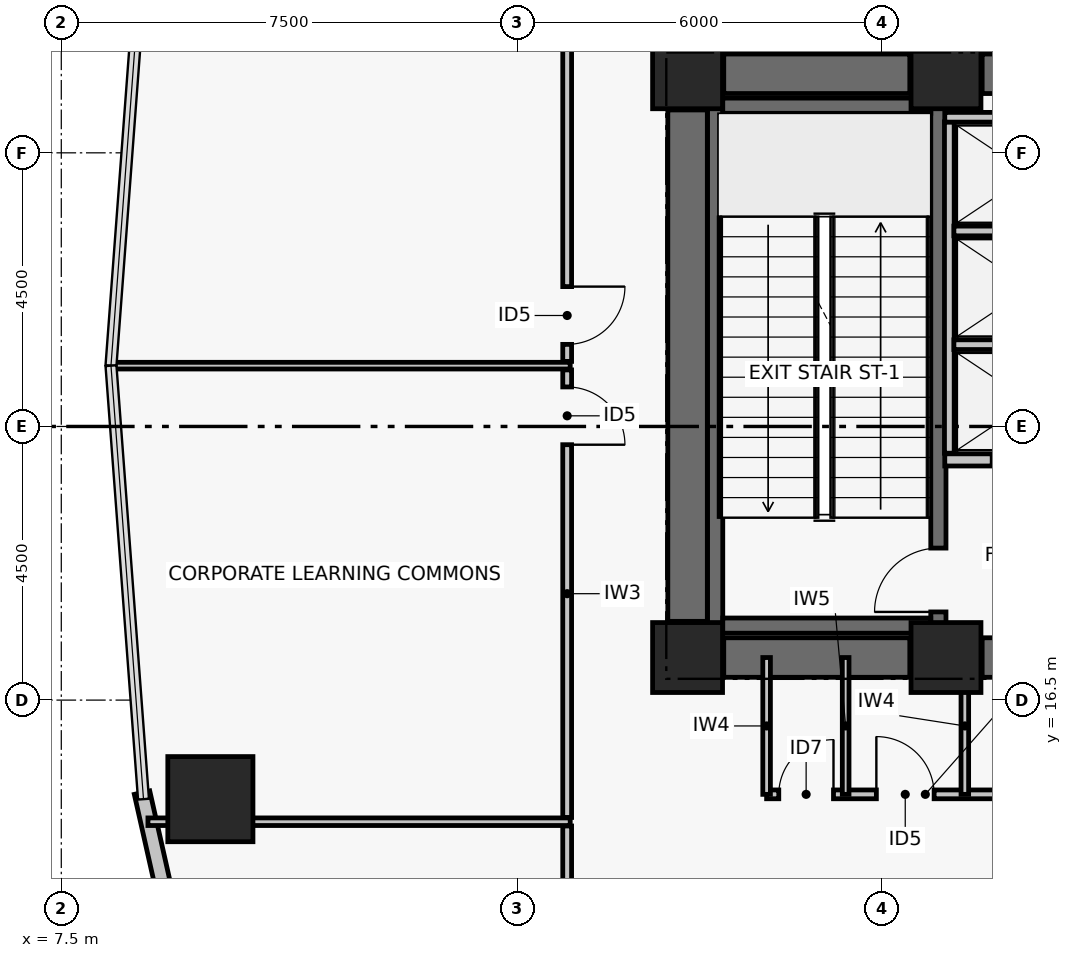
"""IFC4 building model, lengths in metres.
Left out: names, types, materials, properties, quantities, classifications, styles, units other than length and angle.
Written with IfcOpenShell. Run it as: python <this file> out.ifc"""

import sys

from ifc_helpers import new_model, si_unit, direction, frame, frame_2d, origin, origin_2d, place, context, subcontext, project, spatial, rectangle, hollow_rectangle, extrude, element, fill, save


model = new_model("IFC4")
c1 = context("Model", 3, precision=1e-05, world=origin(), true_north=direction((0.0, 1.0)))
c2 = subcontext(c1, "Body", "Model", "MODEL_VIEW")
j1 = project(units=[si_unit("LENGTHUNIT", "METRE"), si_unit("PLANEANGLEUNIT", "RADIAN")], contexts=[c1])
p1 = place(None, origin())
s1 = spatial("IfcSite", under=j1, at=p1, CompositionType="ELEMENT")
p2 = place(p1, origin())
s2 = spatial("IfcBuilding", under=s1, at=p2, CompositionType="ELEMENT")
p3 = place(p2, frame((0.0, 0.0, 22.8)))
s3 = spatial("IfcBuildingStorey", under=s2, at=p3, CompositionType="ELEMENT", Elevation=22.8)
for number, where, z_axis, x_axis in (
    (1, (17.8, 17.2, 0.0), (0.0, 0.0, 1.0), (1.0, 0.0, 0.0)),
    (2, (22.05, 17.2, 0.0), (0.0, 0.0, 1.0), (1.0, 0.0, 0.0)),
    (3, (17.8, 26.8, 0.0), (0.0, 0.0, 1.0), (1.0, 0.0, 0.0)),
    (4, (22.05, 26.8, 0.0), (0.0, 0.0, 1.0), (1.0, 0.0, 0.0)),
):
    element("IfcColumn", number, at=place(p3, frame(where, z_axis=z_axis, x_axis=x_axis)), inside=s3, PredefinedType="COLUMN", context=c2, shape_type="SweptSolid", body=[
        extrude(rectangle(XDim=1.15, YDim=1.15, at=origin_2d()), origin(), (0.0, 0.0, 1.0), 4.8),
    ])
p4 = place(p3, frame((18.395, 17.2, 0.0), z_axis=(0.0, 0.0, 1.0), x_axis=(1.0, 0.0, 0.0)))
e5 = element("IfcWall", 5, at=p4, inside=s3, PredefinedType="SHEAR", context=c2, shape_type="SweptSolid", body=[
    extrude(rectangle(XDim=3.06, YDim=0.65, at=frame_2d((1.53, 0.0))), origin(), (0.0, 0.0, 1.0), 4.55),
])
p5 = place(p3, frame((22.645, 17.2, 0.0), z_axis=(0.0, 0.0, 1.0), x_axis=(1.0, 0.0, 0.0)))
e6 = element("IfcWall", 6, at=p5, inside=s3, PredefinedType="SHEAR", context=c2, shape_type="SweptSolid", body=[
    extrude(rectangle(XDim=1.705, YDim=0.65, at=frame_2d((0.853, 0.0))), origin(), (0.0, 0.0, 1.0), 4.55),
])
p6 = place(p3, frame((18.395, 26.8, 0.0), z_axis=(0.0, 0.0, 1.0), x_axis=(1.0, 0.0, 0.0)))
e7 = element("IfcWall", 7, at=p6, inside=s3, PredefinedType="SHEAR", context=c2, shape_type="SweptSolid", body=[
    extrude(rectangle(XDim=3.06, YDim=0.65, at=frame_2d((1.53, 0.0))), origin(), (0.0, 0.0, 1.0), 4.55),
])
p7 = place(p3, frame((22.645, 26.8, 0.0), z_axis=(0.0, 0.0, 1.0), x_axis=(1.0, 0.0, 0.0)))
e8 = element("IfcWall", 8, at=p7, inside=s3, PredefinedType="SHEAR", context=c2, shape_type="SweptSolid", body=[
    extrude(rectangle(XDim=1.705, YDim=0.65, at=frame_2d((0.853, 0.0))), origin(), (0.0, 0.0, 1.0), 4.55),
])
p8 = place(p3, frame((17.8, 17.795, 0.0), z_axis=(0.0, 0.0, 1.0), x_axis=(0.0, 1.0, 0.0)))
e9 = element("IfcWall", 9, at=p8, inside=s3, PredefinedType="SHEAR", context=c2, shape_type="SweptSolid", body=[
    extrude(rectangle(XDim=8.41, YDim=0.65, at=frame_2d((4.205, 0.0))), origin(), (0.0, 0.0, 1.0), 4.55),
])
p9 = place(p3, frame((18.254, 17.6, 0.0), z_axis=(0.0, 0.0, 1.0), x_axis=(0.0, 1.0, 0.0)))
e10 = element("IfcWall", 10, at=p9, inside=s3, PredefinedType="SHEAR", context=c2, shape_type="SweptSolid", body=[
    extrude(rectangle(XDim=8.8, YDim=0.25, at=frame_2d((4.4, 0.0))), origin(), (0.0, 0.0, 1.0), 4.55),
])
p10 = place(p3, frame((21.925, 17.6, 0.0), z_axis=(0.0, 0.0, 1.0), x_axis=(0.0, 1.0, 0.0)))
e11 = element("IfcWall", 11, at=p10, inside=s3, PredefinedType="SHEAR", context=c2, shape_type="SweptSolid", body=[
    extrude(rectangle(XDim=8.8, YDim=0.25, at=frame_2d((4.4, 0.0))), origin(), (0.0, 0.0, 1.0), 4.55),
])
p11 = place(p10, frame((0.35, 0.0, 0.0)))
e12 = element("IfcOpeningElement", 12, at=p11, cuts=e11, PredefinedType="OPENING", context=c2, shape_type="SweptSolid", body=[
    extrude(rectangle(XDim=1.05, YDim=2.08, at=frame_2d((0.525, 1.04))), frame((0.0, 0.135, 0.0), z_axis=(0.0, -1.0, 0.0), x_axis=(1.0, 0.0, 0.0)), (0.0, 0.0, 1.0), 0.27),
])
for number, where, z_axis, x_axis in (
    (13, (18.379, 17.725, 0.0), (0.0, 0.0, 1.0), (1.0, 0.0, 0.0)),
    (14, (18.379, 26.275, 0.0), (0.0, 0.0, 1.0), (1.0, 0.0, 0.0)),
):
    element("IfcWall", number, at=place(p3, frame(where, z_axis=z_axis, x_axis=x_axis)), inside=s3, PredefinedType="SHEAR", context=c2, shape_type="SweptSolid", body=[
        extrude(rectangle(XDim=3.421, YDim=0.25, at=frame_2d((1.71, 0.0))), origin(), (0.0, 0.0, 1.0), 4.55),
    ])
p12 = place(p3, frame((9.952, 14.871, 0.0), z_axis=(0.0, 0.0, 1.0), x_axis=(1.0, 0.0, 0.0)))
e15 = element("IfcColumn", 15, at=p12, inside=s3, PredefinedType="COLUMN", context=c2, shape_type="SweptSolid", body=[
    extrude(hollow_rectangle(XDim=1.4, YDim=1.4, WallThickness=0.055, at=origin_2d()), origin(), (0.0, 0.0, 1.0), 4.8),
])
p13 = place(p3, frame((10.456, 7.742, 0.0), z_axis=(0.0, 0.0, 1.0), x_axis=(-0.219512195122, 0.975609756098, 0.0)))
e16 = element("IfcWall", 16, at=p13, inside=s3, PredefinedType="PARTITIONING", context=c2, shape_type="SweptSolid", body=[
    extrude(rectangle(XDim=7.417, YDim=0.26, at=frame_2d((3.708, 0.0))), origin(), (0.0, 0.0, 1.0), 4.55),
])
p14 = place(p3, frame((22.03, 20.45, 0.0), z_axis=(0.0, 0.0, 1.0), x_axis=(1.0, 0.0, 0.0)))
e17 = element("IfcWall", 17, at=p14, inside=s3, PredefinedType="PARTITIONING", context=c2, shape_type="SweptSolid", body=[
    extrude(rectangle(XDim=2.8, YDim=0.2, at=frame_2d((1.4, 0.0))), origin(), (0.0, 0.0, 1.0), 4.55),
])
p15 = place(p14, frame((0.78, 0.0, 0.0)))
e18 = element("IfcOpeningElement", 18, at=p15, cuts=e17, PredefinedType="OPENING", context=c2, shape_type="SweptSolid", body=[
    extrude(rectangle(XDim=1.1, YDim=2.08, at=frame_2d((0.55, 1.04))), frame((0.0, 0.11, 0.0), z_axis=(0.0, -1.0, 0.0), x_axis=(1.0, 0.0, 0.0)), (0.0, 0.0, 1.0), 0.22),
])
p16 = place(p3, frame((22.105, 20.56, 0.0), z_axis=(0.0, 0.0, 1.0), x_axis=(0.0, 1.0, 0.0)))
e19 = element("IfcWall", 19, at=p16, inside=s3, PredefinedType="PARTITIONING", context=c2, shape_type="SweptSolid", body=[
    extrude(rectangle(XDim=5.45, YDim=0.16, at=frame_2d((2.725, 0.0))), origin(), (0.0, 0.0, 1.0), 4.55),
])
p17 = place(p3, frame((22.18, 22.345, 0.0), z_axis=(0.0, 0.0, 1.0), x_axis=(1.0, 0.0, 0.0)))
e20 = element("IfcWall", 20, at=p17, inside=s3, PredefinedType="PARTITIONING", context=c2, shape_type="SweptSolid", body=[
    extrude(rectangle(XDim=2.65, YDim=0.16, at=frame_2d((1.325, 0.0))), origin(), (0.0, 0.0, 1.0), 4.55),
])
p18 = place(p3, frame((22.18, 24.215, 0.0), z_axis=(0.0, 0.0, 1.0), x_axis=(1.0, 0.0, 0.0)))
e21 = element("IfcWall", 21, at=p18, inside=s3, PredefinedType="PARTITIONING", context=c2, shape_type="SweptSolid", body=[
    extrude(rectangle(XDim=2.49, YDim=0.16, at=frame_2d((1.245, 0.0))), origin(), (0.0, 0.0, 1.0), 4.55),
])
p19 = place(p3, frame((22.03, 26.085, 0.0), z_axis=(0.0, 0.0, 1.0), x_axis=(1.0, 0.0, 0.0)))
e22 = element("IfcWall", 22, at=p19, inside=s3, PredefinedType="PARTITIONING", context=c2, shape_type="SweptSolid", body=[
    extrude(rectangle(XDim=2.83, YDim=0.16, at=frame_2d((1.415, 0.0))), origin(), (0.0, 0.0, 1.0), 4.55),
])
p20 = place(p3, frame((19.1, 14.95, 0.0), z_axis=(0.0, 0.0, 1.0), x_axis=(1.0, 0.0, 0.0)))
e23 = element("IfcWall", 23, at=p20, inside=s3, PredefinedType="PARTITIONING", context=c2, shape_type="SweptSolid", body=[
    extrude(rectangle(XDim=5.22, YDim=0.145, at=frame_2d((2.61, 0.0))), origin(), (0.0, 0.0, 1.0), 3.13),
])
p21 = place(p20, frame((0.2, 0.0, 0.0)))
e24 = element("IfcOpeningElement", 24, at=p21, cuts=e23, PredefinedType="OPENING", context=c2, shape_type="SweptSolid", body=[
    extrude(rectangle(XDim=0.9, YDim=2.02, at=frame_2d((0.45, 1.01))), frame((0.0, 0.083, 0.0), z_axis=(0.0, -1.0, 0.0), x_axis=(1.0, 0.0, 0.0)), (0.0, 0.0, 1.0), 0.165),
])
p22 = place(p20, frame((1.805, 0.0, 0.0)))
e25 = element("IfcOpeningElement", 25, at=p22, cuts=e23, PredefinedType="OPENING", context=c2, shape_type="SweptSolid", body=[
    extrude(rectangle(XDim=0.95, YDim=2.06, at=frame_2d((0.475, 1.03))), frame((0.0, 0.083, 0.0), z_axis=(0.0, -1.0, 0.0), x_axis=(1.0, 0.0, 0.0)), (0.0, 0.0, 1.0), 0.165),
])
p23 = place(p20, frame((3.765, 0.0, 0.0)))
e26 = element("IfcOpeningElement", 26, at=p23, cuts=e23, PredefinedType="OPENING", context=c2, shape_type="SweptSolid", body=[
    extrude(rectangle(XDim=0.95, YDim=2.06, at=frame_2d((0.475, 1.03))), frame((0.0, 0.083, 0.0), z_axis=(0.0, -1.0, 0.0), x_axis=(1.0, 0.0, 0.0)), (0.0, 0.0, 1.0), 0.165),
])
p24 = place(p3, frame((19.1, 14.95, 0.0), z_axis=(0.0, 0.0, 1.0), x_axis=(0.0, 1.0, 0.0)))
e27 = element("IfcWall", 27, at=p24, inside=s3, PredefinedType="PARTITIONING", context=c2, shape_type="SweptSolid", body=[
    extrude(rectangle(XDim=2.25, YDim=0.125, at=frame_2d((1.125, 0.0))), origin(), (0.0, 0.0, 1.0), 3.68),
])
p25 = place(p3, frame((20.4, 14.95, 0.0), z_axis=(0.0, 0.0, 1.0), x_axis=(0.0, 1.0, 0.0)))
e28 = element("IfcWall", 28, at=p25, inside=s3, PredefinedType="PARTITIONING", context=c2, shape_type="SweptSolid", body=[
    extrude(rectangle(XDim=2.25, YDim=0.11, at=frame_2d((1.125, 0.0))), origin(), (0.0, 0.0, 1.0), 3.68),
])
p26 = place(p3, frame((22.36, 14.95, 0.0), z_axis=(0.0, 0.0, 1.0), x_axis=(0.0, 1.0, 0.0)))
e29 = element("IfcWall", 29, at=p26, inside=s3, PredefinedType="PARTITIONING", context=c2, shape_type="SweptSolid", body=[
    extrude(rectangle(XDim=2.25, YDim=0.125, at=frame_2d((1.125, 0.0))), origin(), (0.0, 0.0, 1.0), 3.13),
])
p27 = place(p3, frame((15.82, 21.93, 0.0), z_axis=(0.0, 0.0, 1.0), x_axis=(0.0, -1.0, 0.0)))
e30 = element("IfcWall", 30, at=p27, inside=s3, PredefinedType="PARTITIONING", context=c2, shape_type="SweptSolid", body=[
    extrude(rectangle(XDim=7.36, YDim=0.145, at=frame_2d((3.68, 0.0))), origin(), (0.0, 0.0, 1.0), 3.13),
])
p28 = place(p27, frame((0.28, 0.0, 0.0)))
e31 = element("IfcOpeningElement", 31, at=p28, cuts=e30, PredefinedType="OPENING", context=c2, shape_type="SweptSolid", body=[
    extrude(rectangle(XDim=0.95, YDim=2.06, at=frame_2d((0.475, 1.03))), frame((0.0, 0.083, 0.0), z_axis=(0.0, -1.0, 0.0), x_axis=(1.0, 0.0, 0.0)), (0.0, 0.0, 1.0), 0.165),
])
p29 = place(p3, frame((15.82, 14.43, 0.0), z_axis=(0.0, 0.0, 1.0), x_axis=(0.0, -1.0, 0.0)))
e32 = element("IfcWall", 32, at=p29, inside=s3, PredefinedType="PARTITIONING", context=c2, shape_type="SweptSolid", body=[
    extrude(rectangle(XDim=1.14, YDim=0.145, at=frame_2d((0.57, 0.0))), origin(), (0.0, 0.0, 1.0), 4.55),
])
p30 = place(p3, frame((15.82, 28.7, 0.0), z_axis=(0.0, 0.0, 1.0), x_axis=(0.0, -1.0, 0.0)))
e33 = element("IfcWall", 33, at=p30, inside=s3, PredefinedType="PARTITIONING", context=c2, shape_type="SweptSolid", body=[
    extrude(rectangle(XDim=6.63, YDim=0.145, at=frame_2d((3.315, 0.0))), origin(), (0.0, 0.0, 1.0), 3.13),
])
p31 = place(p30, frame((5.4, 0.0, 0.0)))
e34 = element("IfcOpeningElement", 34, at=p31, cuts=e33, PredefinedType="OPENING", context=c2, shape_type="SweptSolid", body=[
    extrude(rectangle(XDim=0.95, YDim=2.06, at=frame_2d((0.475, 1.03))), frame((0.0, 0.083, 0.0), z_axis=(0.0, -1.0, 0.0), x_axis=(1.0, 0.0, 0.0)), (0.0, 0.0, 1.0), 0.165),
])
p32 = place(p3, frame((8.925, 14.5, 0.0), z_axis=(0.0, 0.0, 1.0), x_axis=(1.0, 0.0, 0.0)))
e35 = element("IfcWall", 35, at=p32, inside=s3, PredefinedType="PARTITIONING", context=c2, shape_type="SweptSolid", body=[
    extrude(rectangle(XDim=6.945, YDim=0.125, at=frame_2d((3.472, 0.0))), origin(), (0.0, 0.0, 1.0), 3.13),
])
p33 = place(p3, frame((8.307, 22.0, 0.0), z_axis=(0.0, 0.0, 1.0), x_axis=(1.0, 0.0, 0.0)))
e36 = element("IfcWall", 36, at=p33, inside=s3, PredefinedType="PARTITIONING", context=c2, shape_type="SweptSolid", body=[
    extrude(rectangle(XDim=7.563, YDim=0.11, at=frame_2d((3.781, 0.0))), origin(), (0.0, 0.0, 1.0), 3.93),
])
p34 = place(p11, origin())
e37 = element("IfcDoor", 37, at=p34, inside=s3, OperationType="SINGLE_SWING_LEFT", PredefinedType="DOOR", context=c2, shape_type="SweptSolid", body=[
    extrude(rectangle(XDim=1.05, YDim=2.08, at=frame_2d((0.525, 1.04))), frame((0.0, 0.025, 0.0), z_axis=(0.0, -1.0, 0.0), x_axis=(1.0, 0.0, 0.0)), (0.0, 0.0, 1.0), 0.05),
])
fill(e12, e37)
p35 = place(p21, origin())
e38 = element("IfcDoor", 38, at=p35, inside=s3, OperationType="SINGLE_SWING_RIGHT", PredefinedType="DOOR", context=c2, shape_type="SweptSolid", body=[
    extrude(rectangle(XDim=0.9, YDim=2.02, at=frame_2d((0.45, 1.01))), frame((0.0, 0.025, 0.0), z_axis=(0.0, -1.0, 0.0), x_axis=(1.0, 0.0, 0.0)), (0.0, 0.0, 1.0), 0.05),
])
fill(e24, e38)
p36 = place(p22, origin())
e39 = element("IfcDoor", 39, at=p36, inside=s3, OperationType="SINGLE_SWING_LEFT", PredefinedType="DOOR", context=c2, shape_type="SweptSolid", body=[
    extrude(rectangle(XDim=0.95, YDim=2.06, at=frame_2d((0.475, 1.03))), frame((0.0, 0.025, 0.0), z_axis=(0.0, -1.0, 0.0), x_axis=(1.0, 0.0, 0.0)), (0.0, 0.0, 1.0), 0.05),
])
fill(e25, e39)
p37 = place(p28, origin())
e40 = element("IfcDoor", 40, at=p37, inside=s3, OperationType="SINGLE_SWING_RIGHT", PredefinedType="DOOR", context=c2, shape_type="SweptSolid", body=[
    extrude(rectangle(XDim=0.95, YDim=2.06, at=frame_2d((0.475, 1.03))), frame((0.0, 0.025, 0.0), z_axis=(0.0, -1.0, 0.0), x_axis=(1.0, 0.0, 0.0)), (0.0, 0.0, 1.0), 0.05),
])
fill(e31, e40)
p38 = place(p31, origin())
e41 = element("IfcDoor", 41, at=p38, inside=s3, OperationType="SINGLE_SWING_LEFT", PredefinedType="DOOR", context=c2, shape_type="SweptSolid", body=[
    extrude(rectangle(XDim=0.95, YDim=2.06, at=frame_2d((0.475, 1.03))), frame((0.0, 0.025, 0.0), z_axis=(0.0, -1.0, 0.0), x_axis=(1.0, 0.0, 0.0)), (0.0, 0.0, 1.0), 0.05),
])
fill(e34, e41)
save(model, sys.argv[1])
